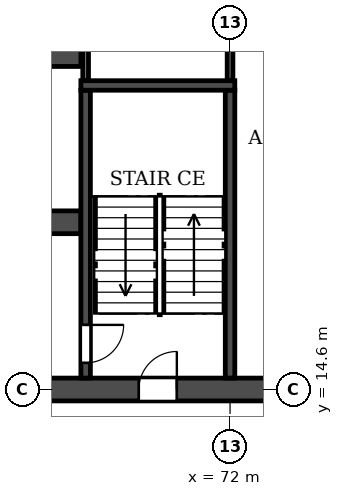
"""IFC4 building model, lengths in metres.
Left out: names, types, materials, properties, quantities, classifications, styles, units other than length and angle.
Written with IfcOpenShell. Run it as: python <this file> out.ifc"""

import sys

from ifc_helpers import new_model, si_unit, direction, frame, frame_2d, origin, place, context, subcontext, project, spatial, rectangle, extrude, element, fill, save


model = new_model("IFC4")
c1 = context("Model", 3, precision=1e-05, world=origin(), true_north=direction((0.0, 1.0)))
c2 = subcontext(c1, "Body", "Model", "MODEL_VIEW")
j1 = project(units=[si_unit("LENGTHUNIT", "METRE"), si_unit("PLANEANGLEUNIT", "RADIAN")], contexts=[c1])
p1 = place(None, origin())
s1 = spatial("IfcSite", under=j1, at=p1, CompositionType="ELEMENT")
p2 = place(p1, origin())
s2 = spatial("IfcBuilding", under=s1, at=p2, CompositionType="ELEMENT")
p3 = place(p2, frame((0.0, 0.0, 56.4)))
s3 = spatial("IfcBuildingStorey", under=s2, at=p3, CompositionType="ELEMENT", Elevation=56.4)
p4 = place(p3, frame((8.6, 14.6, 0.0), z_axis=(0.0, 0.0, 1.0), x_axis=(1.0, 0.0, 0.0)))
e1 = element("IfcWall", 1, at=p4, inside=s3, PredefinedType="SOLIDWALL", context=c2, shape_type="SweptSolid", body=[
    extrude(rectangle(XDim=84.8, YDim=0.6, at=frame_2d((42.4, 0.0))), origin(), (0.0, 0.0, 1.0), 3.05),
])
p5 = place(p4, frame((1.35, 0.0, 0.0)))
e2 = element("IfcOpeningElement", 2, at=p5, cuts=e1, PredefinedType="OPENING", context=c2, shape_type="SweptSolid", body=[
    extrude(rectangle(XDim=1.0, YDim=2.1, at=frame_2d((0.5, 1.05))), frame((0.0, 0.31, 0.0), z_axis=(0.0, -1.0, 0.0), x_axis=(1.0, 0.0, 0.0)), (0.0, 0.0, 1.0), 0.62),
])
p6 = place(p4, frame((6.05, 0.0, 0.0)))
e3 = element("IfcOpeningElement", 3, at=p6, cuts=e1, PredefinedType="OPENING", context=c2, shape_type="SweptSolid", body=[
    extrude(rectangle(XDim=1.0, YDim=2.1, at=frame_2d((0.5, 1.05))), frame((0.0, 0.31, 0.0), z_axis=(0.0, -1.0, 0.0), x_axis=(1.0, 0.0, 0.0)), (0.0, 0.0, 1.0), 0.62),
])
p7 = place(p4, frame((10.3, 0.0, 0.0)))
e4 = element("IfcOpeningElement", 4, at=p7, cuts=e1, PredefinedType="OPENING", context=c2, shape_type="SweptSolid", body=[
    extrude(rectangle(XDim=1.0, YDim=2.1, at=frame_2d((0.5, 1.05))), frame((0.0, 0.31, 0.0), z_axis=(0.0, -1.0, 0.0), x_axis=(1.0, 0.0, 0.0)), (0.0, 0.0, 1.0), 0.62),
])
p8 = place(p4, frame((18.2, 0.0, 0.0)))
e5 = element("IfcOpeningElement", 5, at=p8, cuts=e1, PredefinedType="OPENING", context=c2, shape_type="SweptSolid", body=[
    extrude(rectangle(XDim=1.0, YDim=2.1, at=frame_2d((0.5, 1.05))), frame((0.0, 0.31, 0.0), z_axis=(0.0, -1.0, 0.0), x_axis=(1.0, 0.0, 0.0)), (0.0, 0.0, 1.0), 0.62),
])
p9 = place(p4, frame((22.8, 0.0, 0.0)))
e6 = element("IfcOpeningElement", 6, at=p9, cuts=e1, PredefinedType="OPENING", context=c2, shape_type="SweptSolid", body=[
    extrude(rectangle(XDim=1.0, YDim=2.1, at=frame_2d((0.5, 1.05))), frame((0.0, 0.31, 0.0), z_axis=(0.0, -1.0, 0.0), x_axis=(1.0, 0.0, 0.0)), (0.0, 0.0, 1.0), 0.62),
])
p10 = place(p4, frame((35.4, 0.0, 0.0)))
e7 = element("IfcOpeningElement", 7, at=p10, cuts=e1, PredefinedType="OPENING", context=c2, shape_type="SweptSolid", body=[
    extrude(rectangle(XDim=1.0, YDim=2.1, at=frame_2d((0.5, 1.05))), frame((0.0, 0.31, 0.0), z_axis=(0.0, -1.0, 0.0), x_axis=(1.0, 0.0, 0.0)), (0.0, 0.0, 1.0), 0.62),
])
p11 = place(p4, frame((39.3, 0.0, 0.0)))
e8 = element("IfcOpeningElement", 8, at=p11, cuts=e1, PredefinedType="OPENING", context=c2, shape_type="SweptSolid", body=[
    extrude(rectangle(XDim=1.0, YDim=2.1, at=frame_2d((0.5, 1.05))), frame((0.0, 0.31, 0.0), z_axis=(0.0, -1.0, 0.0), x_axis=(1.0, 0.0, 0.0)), (0.0, 0.0, 1.0), 0.62),
])
p12 = place(p4, frame((41.9, 0.0, 0.0)))
e9 = element("IfcOpeningElement", 9, at=p12, cuts=e1, PredefinedType="OPENING", context=c2, shape_type="SweptSolid", body=[
    extrude(rectangle(XDim=1.0, YDim=2.1, at=frame_2d((0.5, 1.05))), frame((0.0, 0.31, 0.0), z_axis=(0.0, -1.0, 0.0), x_axis=(1.0, 0.0, 0.0)), (0.0, 0.0, 1.0), 0.62),
])
p13 = place(p4, frame((47.1, 0.0, 0.0)))
e10 = element("IfcOpeningElement", 10, at=p13, cuts=e1, PredefinedType="OPENING", context=c2, shape_type="SweptSolid", body=[
    extrude(rectangle(XDim=1.0, YDim=2.1, at=frame_2d((0.5, 1.05))), frame((0.0, 0.31, 0.0), z_axis=(0.0, -1.0, 0.0), x_axis=(1.0, 0.0, 0.0)), (0.0, 0.0, 1.0), 0.62),
])
p14 = place(p4, frame((61.0, 0.0, 0.0)))
e11 = element("IfcOpeningElement", 11, at=p14, cuts=e1, PredefinedType="OPENING", context=c2, shape_type="SweptSolid", body=[
    extrude(rectangle(XDim=1.0, YDim=2.1, at=frame_2d((0.5, 1.05))), frame((0.0, 0.31, 0.0), z_axis=(0.0, -1.0, 0.0), x_axis=(1.0, 0.0, 0.0)), (0.0, 0.0, 1.0), 0.62),
])
p15 = place(p4, frame((65.6, 0.0, 0.0)))
e12 = element("IfcOpeningElement", 12, at=p15, cuts=e1, PredefinedType="OPENING", context=c2, shape_type="SweptSolid", body=[
    extrude(rectangle(XDim=1.0, YDim=2.1, at=frame_2d((0.5, 1.05))), frame((0.0, 0.31, 0.0), z_axis=(0.0, -1.0, 0.0), x_axis=(1.0, 0.0, 0.0)), (0.0, 0.0, 1.0), 0.62),
])
p16 = place(p4, frame((73.5, 0.0, 0.0)))
e13 = element("IfcOpeningElement", 13, at=p16, cuts=e1, PredefinedType="OPENING", context=c2, shape_type="SweptSolid", body=[
    extrude(rectangle(XDim=1.0, YDim=2.1, at=frame_2d((0.5, 1.05))), frame((0.0, 0.31, 0.0), z_axis=(0.0, -1.0, 0.0), x_axis=(1.0, 0.0, 0.0)), (0.0, 0.0, 1.0), 0.62),
])
p17 = place(p4, frame((77.9, 0.0, 0.0)))
e14 = element("IfcOpeningElement", 14, at=p17, cuts=e1, PredefinedType="OPENING", context=c2, shape_type="SweptSolid", body=[
    extrude(rectangle(XDim=1.0, YDim=2.1, at=frame_2d((0.5, 1.05))), frame((0.0, 0.31, 0.0), z_axis=(0.0, -1.0, 0.0), x_axis=(1.0, 0.0, 0.0)), (0.0, 0.0, 1.0), 0.62),
])
p18 = place(p4, frame((82.6, 0.0, 0.0)))
e15 = element("IfcOpeningElement", 15, at=p18, cuts=e1, PredefinedType="OPENING", context=c2, shape_type="SweptSolid", body=[
    extrude(rectangle(XDim=1.0, YDim=2.1, at=frame_2d((0.5, 1.05))), frame((0.0, 0.31, 0.0), z_axis=(0.0, -1.0, 0.0), x_axis=(1.0, 0.0, 0.0)), (0.0, 0.0, 1.0), 0.62),
])
p19 = place(p3, frame((33.925, 19.0, 0.0), z_axis=(0.0, 0.0, 1.0), x_axis=(1.0, 0.0, 0.0)))
e16 = element("IfcWall", 16, at=p19, inside=s3, PredefinedType="SOLIDWALL", context=c2, shape_type="SweptSolid", body=[
    extrude(rectangle(XDim=34.15, YDim=0.6, at=frame_2d((17.075, 0.0))), origin(), (0.0, 0.0, 1.0), 3.05),
])
p20 = place(p19, frame((16.175, 0.0, 0.0)))
e17 = element("IfcOpeningElement", 17, at=p20, cuts=e16, PredefinedType="OPENING", context=c2, shape_type="SweptSolid", body=[
    extrude(rectangle(XDim=1.8, YDim=2.1, at=frame_2d((0.9, 1.05))), frame((0.0, 0.31, 0.0), z_axis=(0.0, -1.0, 0.0), x_axis=(1.0, 0.0, 0.0)), (0.0, 0.0, 1.0), 0.62),
])
p21 = place(p19, frame((1.525, 0.0, 0.0)))
e18 = element("IfcOpeningElement", 18, at=p21, cuts=e16, PredefinedType="OPENING", context=c2, shape_type="SweptSolid", body=[
    extrude(rectangle(XDim=1.8, YDim=2.1, at=frame_2d((0.9, 1.05))), frame((0.0, 0.31, 0.0), z_axis=(0.0, -1.0, 0.0), x_axis=(1.0, 0.0, 0.0)), (0.0, 0.0, 1.0), 0.62),
])
p22 = place(p19, frame((8.725, 0.0, 0.0)))
e19 = element("IfcOpeningElement", 19, at=p22, cuts=e16, PredefinedType="OPENING", context=c2, shape_type="SweptSolid", body=[
    extrude(rectangle(XDim=1.1, YDim=2.1, at=frame_2d((0.55, 1.05))), frame((0.0, 0.31, 0.0), z_axis=(0.0, -1.0, 0.0), x_axis=(1.0, 0.0, 0.0)), (0.0, 0.0, 1.0), 0.62),
])
p23 = place(p19, frame((11.325, 0.0, 0.0)))
e20 = element("IfcOpeningElement", 20, at=p23, cuts=e16, PredefinedType="OPENING", context=c2, shape_type="SweptSolid", body=[
    extrude(rectangle(XDim=1.1, YDim=2.1, at=frame_2d((0.55, 1.05))), frame((0.0, 0.31, 0.0), z_axis=(0.0, -1.0, 0.0), x_axis=(1.0, 0.0, 0.0)), (0.0, 0.0, 1.0), 0.62),
])
p24 = place(p19, frame((13.925, 0.0, 0.0)))
e21 = element("IfcOpeningElement", 21, at=p24, cuts=e16, PredefinedType="OPENING", context=c2, shape_type="SweptSolid", body=[
    extrude(rectangle(XDim=1.1, YDim=2.1, at=frame_2d((0.55, 1.05))), frame((0.0, 0.31, 0.0), z_axis=(0.0, -1.0, 0.0), x_axis=(1.0, 0.0, 0.0)), (0.0, 0.0, 1.0), 0.62),
])
p25 = place(p19, frame((19.125, 0.0, 0.0)))
e22 = element("IfcOpeningElement", 22, at=p25, cuts=e16, PredefinedType="OPENING", context=c2, shape_type="SweptSolid", body=[
    extrude(rectangle(XDim=1.1, YDim=2.1, at=frame_2d((0.55, 1.05))), frame((0.0, 0.31, 0.0), z_axis=(0.0, -1.0, 0.0), x_axis=(1.0, 0.0, 0.0)), (0.0, 0.0, 1.0), 0.62),
])
p26 = place(p19, frame((21.725, 0.0, 0.0)))
e23 = element("IfcOpeningElement", 23, at=p26, cuts=e16, PredefinedType="OPENING", context=c2, shape_type="SweptSolid", body=[
    extrude(rectangle(XDim=1.1, YDim=2.1, at=frame_2d((0.55, 1.05))), frame((0.0, 0.31, 0.0), z_axis=(0.0, -1.0, 0.0), x_axis=(1.0, 0.0, 0.0)), (0.0, 0.0, 1.0), 0.62),
])
p27 = place(p19, frame((24.325, 0.0, 0.0)))
e24 = element("IfcOpeningElement", 24, at=p27, cuts=e16, PredefinedType="OPENING", context=c2, shape_type="SweptSolid", body=[
    extrude(rectangle(XDim=1.1, YDim=2.1, at=frame_2d((0.55, 1.05))), frame((0.0, 0.31, 0.0), z_axis=(0.0, -1.0, 0.0), x_axis=(1.0, 0.0, 0.0)), (0.0, 0.0, 1.0), 0.62),
])
p28 = place(p19, frame((30.825, 0.0, 0.0)))
e25 = element("IfcOpeningElement", 25, at=p28, cuts=e16, PredefinedType="OPENING", context=c2, shape_type="SweptSolid", body=[
    extrude(rectangle(XDim=1.8, YDim=2.1, at=frame_2d((0.9, 1.05))), frame((0.0, 0.31, 0.0), z_axis=(0.0, -1.0, 0.0), x_axis=(1.0, 0.0, 0.0)), (0.0, 0.0, 1.0), 0.62),
])
p29 = place(p3, frame((33.925, 23.4, 0.0), z_axis=(0.0, 0.0, 1.0), x_axis=(1.0, 0.0, 0.0)))
e26 = element("IfcWall", 26, at=p29, inside=s3, PredefinedType="SOLIDWALL", context=c2, shape_type="SweptSolid", body=[
    extrude(rectangle(XDim=34.15, YDim=0.6, at=frame_2d((17.075, 0.0))), origin(), (0.0, 0.0, 1.0), 3.05),
])
p30 = place(p29, frame((16.175, 0.0, 0.0)))
e27 = element("IfcOpeningElement", 27, at=p30, cuts=e26, PredefinedType="OPENING", context=c2, shape_type="SweptSolid", body=[
    extrude(rectangle(XDim=1.8, YDim=2.1, at=frame_2d((0.9, 1.05))), frame((0.0, 0.31, 0.0), z_axis=(0.0, -1.0, 0.0), x_axis=(1.0, 0.0, 0.0)), (0.0, 0.0, 1.0), 0.62),
])
p31 = place(p29, frame((11.025, 0.0, 0.0)))
e28 = element("IfcOpeningElement", 28, at=p31, cuts=e26, PredefinedType="OPENING", context=c2, shape_type="SweptSolid", body=[
    extrude(rectangle(XDim=1.1, YDim=2.1, at=frame_2d((0.55, 1.05))), frame((0.0, 0.31, 0.0), z_axis=(0.0, -1.0, 0.0), x_axis=(1.0, 0.0, 0.0)), (0.0, 0.0, 1.0), 0.62),
])
p32 = place(p3, frame((68.2, 14.9, 0.0), z_axis=(0.0, 0.0, 1.0), x_axis=(0.0, 1.0, 0.0)))
e29 = element("IfcWall", 29, at=p32, inside=s3, PredefinedType="SOLIDWALL", context=c2, shape_type="SweptSolid", body=[
    extrude(rectangle(XDim=7.575, YDim=0.25, at=frame_2d((3.788, 0.0))), origin(), (0.0, 0.0, 1.0), 3.05),
])
p33 = place(p32, frame((0.4, 0.0, 0.0)))
e30 = element("IfcOpeningElement", 30, at=p33, cuts=e29, PredefinedType="OPENING", context=c2, shape_type="SweptSolid", body=[
    extrude(rectangle(XDim=1.0, YDim=2.1, at=frame_2d((0.5, 1.05))), frame((0.0, 0.135, 0.0), z_axis=(0.0, -1.0, 0.0), x_axis=(1.0, 0.0, 0.0)), (0.0, 0.0, 1.0), 0.27),
])
p34 = place(p3, frame((72.0, 14.9, 0.0), z_axis=(0.0, 0.0, 1.0), x_axis=(0.0, 1.0, 0.0)))
e31 = element("IfcWall", 31, at=p34, inside=s3, PredefinedType="SOLIDWALL", context=c2, shape_type="SweptSolid", body=[
    extrude(rectangle(XDim=7.575, YDim=0.25, at=frame_2d((3.788, 0.0))), origin(), (0.0, 0.0, 1.0), 3.05),
])
p35 = place(p3, frame((68.075, 22.6, 0.0), z_axis=(0.0, 0.0, 1.0), x_axis=(1.0, 0.0, 0.0)))
e32 = element("IfcWall", 32, at=p35, inside=s3, PredefinedType="SOLIDWALL", context=c2, shape_type="SweptSolid", body=[
    extrude(rectangle(XDim=4.05, YDim=0.25, at=frame_2d((2.025, 0.0))), origin(), (0.0, 0.0, 1.0), 3.05),
])
for number, where, z_axis, x_axis in (
    (33, (68.2, 22.735, 0.0), (0.0, 0.0, 1.0), (0.0, 1.0, 0.0)),
    (34, (72.0, 22.735, 0.0), (0.0, 0.0, 1.0), (0.0, 1.0, 0.0)),
):
    element("IfcWall", number, at=place(p3, frame(where, z_axis=z_axis, x_axis=x_axis)), inside=s3, PredefinedType="PARTITIONING", context=c2, shape_type="SweptSolid", body=[
        extrude(rectangle(XDim=4.755, YDim=0.15, at=frame_2d((2.377, 0.0))), origin(), (0.0, 0.0, 1.0), 3.05),
    ])
p36 = place(p14, origin())
e35 = element("IfcDoor", 35, at=p36, inside=s3, OperationType="SINGLE_SWING_RIGHT", PredefinedType="DOOR", context=c2, shape_type="SweptSolid", body=[
    extrude(rectangle(XDim=1.0, YDim=2.1, at=frame_2d((0.5, 1.05))), frame((0.0, 0.025, 0.0), z_axis=(0.0, -1.0, 0.0), x_axis=(1.0, 0.0, 0.0)), (0.0, 0.0, 1.0), 0.05),
])
fill(e11, e35)
p37 = place(p33, frame((1.0, 0.0, 0.0), z_axis=(0.0, 0.0, 1.0), x_axis=(-1.0, 0.0, 0.0)))
e36 = element("IfcDoor", 36, at=p37, inside=s3, OperationType="SINGLE_SWING_LEFT", PredefinedType="DOOR", context=c2, shape_type="SweptSolid", body=[
    extrude(rectangle(XDim=1.0, YDim=2.1, at=frame_2d((0.5, 1.05))), frame((0.0, 0.025, 0.0), z_axis=(0.0, -1.0, 0.0), x_axis=(1.0, 0.0, 0.0)), (0.0, 0.0, 1.0), 0.05),
])
fill(e30, e36)
save(model, sys.argv[1])
